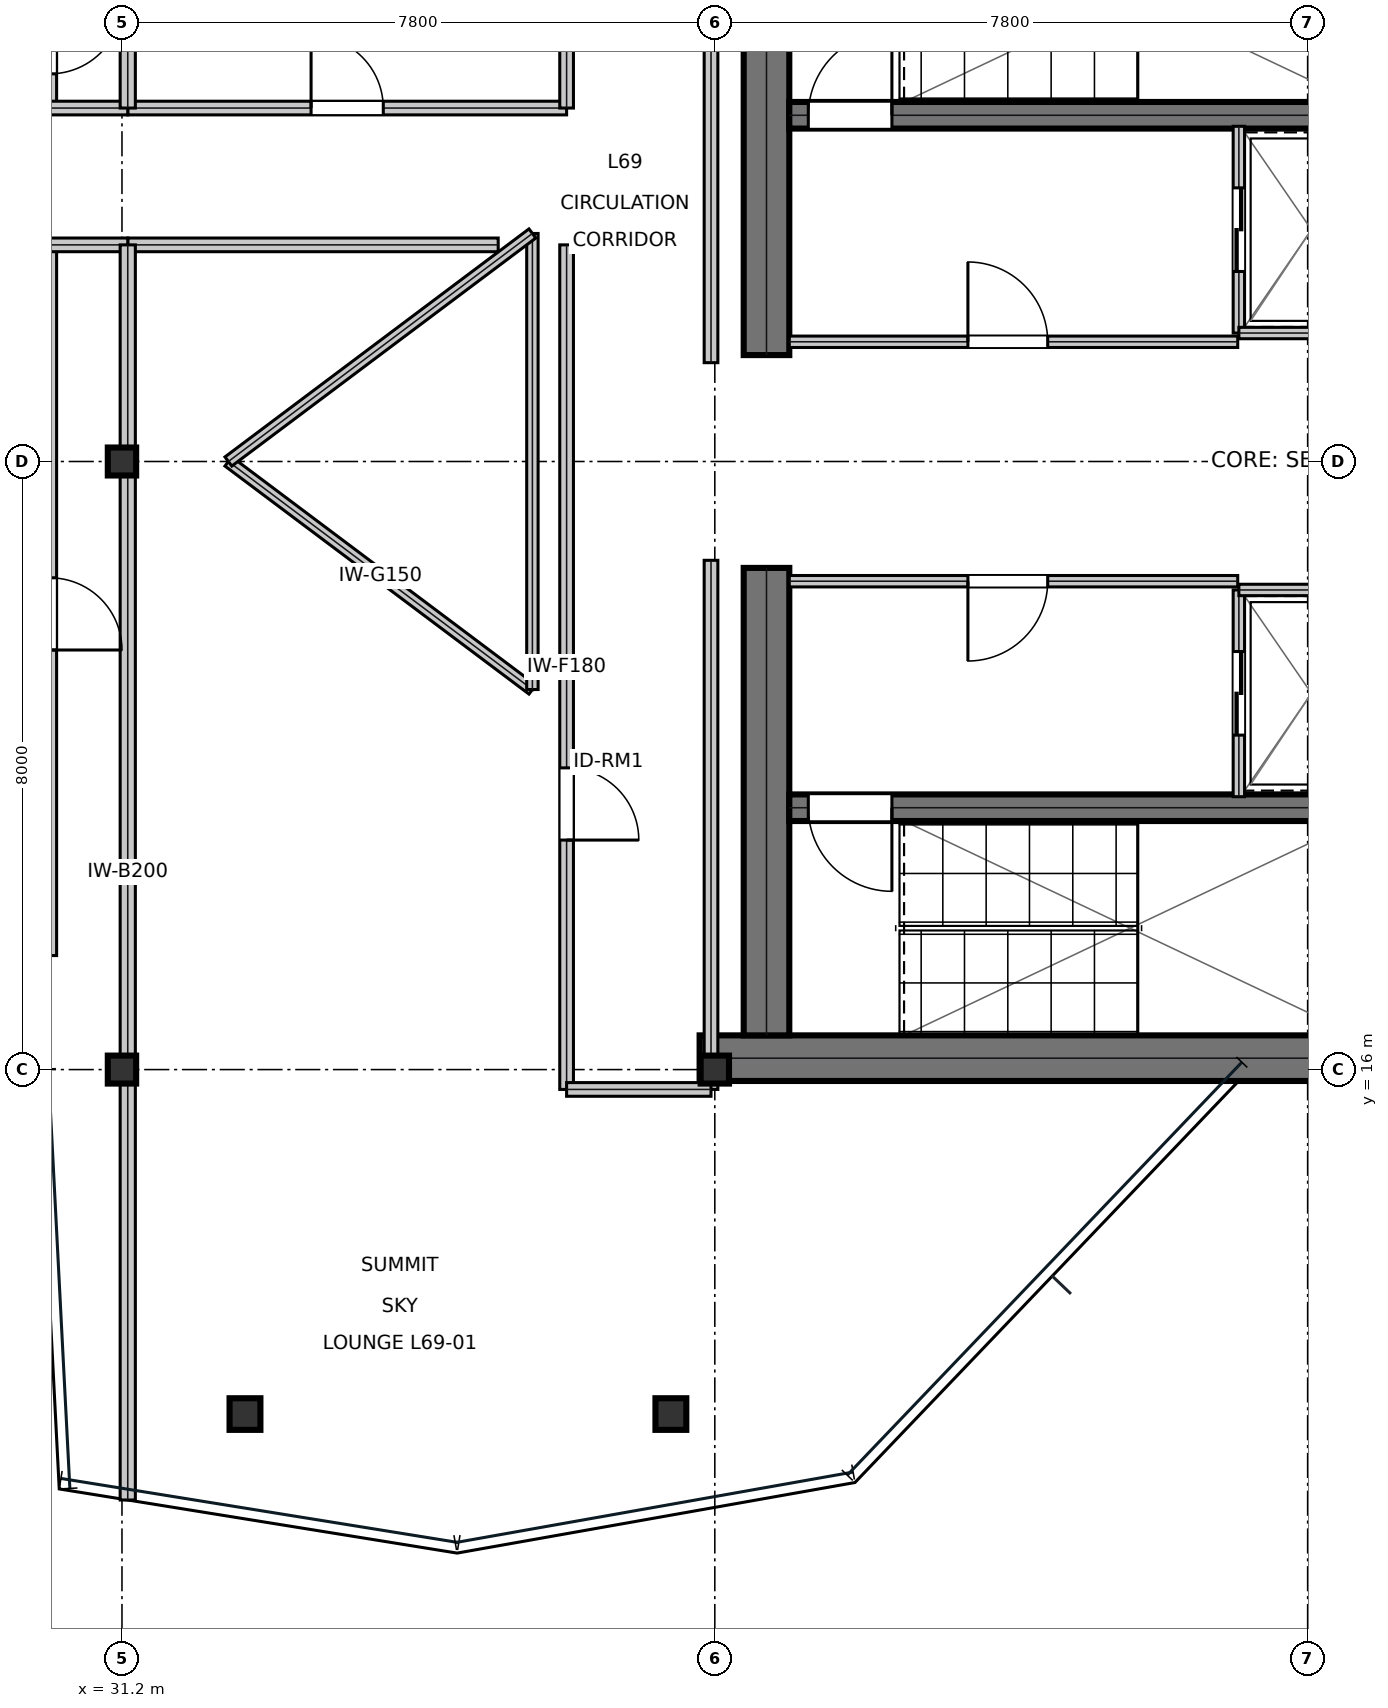
"""IFC4 building model, lengths in metres.
Left out: names, types, materials, properties, quantities, classifications, styles, units other than length and angle.
Written with IfcOpenShell. Run it as: python <this file> out.ifc"""

import sys

from ifc_helpers import new_model, si_unit, direction, frame, frame_2d, origin, origin_2d, place, context, subcontext, project, spatial, rectangle, i_section, extrude, element, fill, save


model = new_model("IFC4")
c1 = context("Model", 3, precision=1e-05, world=origin(), true_north=direction((0.0, 1.0)))
c2 = subcontext(c1, "Body", "Model", "MODEL_VIEW")
j1 = project(units=[si_unit("LENGTHUNIT", "METRE"), si_unit("PLANEANGLEUNIT", "RADIAN")], contexts=[c1])
p1 = place(None, origin())
s1 = spatial("IfcSite", under=j1, at=p1, CompositionType="ELEMENT")
p2 = place(p1, origin())
s2 = spatial("IfcBuilding", under=s1, at=p2, CompositionType="ELEMENT")
p3 = place(p2, frame((0.0, 0.0, 295.2)))
s3 = spatial("IfcBuildingStorey", under=s2, at=p3, CompositionType="ELEMENT", Elevation=295.2)
p4 = place(p3, frame((38.8, 16.15, 0.0), z_axis=(0.0, 0.0, 1.0), x_axis=(1.0, 0.0, 0.0)))
e1 = element("IfcWall", 1, at=p4, inside=s3, PredefinedType="SHEAR", context=c2, shape_type="SweptSolid", body=[
    extrude(rectangle(XDim=16.0, YDim=0.6, at=frame_2d((8.0, 0.0))), origin(), (0.0, 0.0, 1.0), 3.81),
])
for number, where, z_axis, x_axis in (
    (2, (39.68, 16.45, 0.0), (0.0, 0.0, 1.0), (0.0, 1.0, 0.0)),
    (3, (39.68, 25.4, 0.0), (0.0, 0.0, 1.0), (0.0, 1.0, 0.0)),
):
    element("IfcWall", number, at=place(p3, frame(where, z_axis=z_axis, x_axis=x_axis)), inside=s3, PredefinedType="SHEAR", context=c2, shape_type="SweptSolid", body=[
        extrude(rectangle(XDim=6.15, YDim=0.6, at=frame_2d((3.075, 0.0))), origin(), (0.0, 0.0, 1.0), 3.81),
    ])
p5 = place(p3, frame((39.98, 28.555, 0.0), z_axis=(0.0, 0.0, 1.0), x_axis=(1.0, 0.0, 0.0)))
e4 = element("IfcWall", 4, at=p5, inside=s3, PredefinedType="SHEAR", context=c2, shape_type="SweptSolid", body=[
    extrude(rectangle(XDim=7.71, YDim=0.35, at=frame_2d((3.855, 0.0))), origin(), (0.0, 0.0, 1.0), 3.81),
])
p6 = place(p5, frame((0.25, 0.0, 0.0)))
e5 = element("IfcOpeningElement", 5, at=p6, cuts=e4, PredefinedType="OPENING", context=c2, shape_type="SweptSolid", body=[
    extrude(rectangle(XDim=1.1, YDim=2.15, at=frame_2d((0.55, 1.075))), frame((0.0, 0.185, 0.0), z_axis=(0.0, -1.0, 0.0), x_axis=(1.0, 0.0, 0.0)), (0.0, 0.0, 1.0), 0.37),
])
p7 = place(p3, frame((39.98, 19.445, 0.0), z_axis=(0.0, 0.0, 1.0), x_axis=(1.0, 0.0, 0.0)))
e6 = element("IfcWall", 6, at=p7, inside=s3, PredefinedType="SHEAR", context=c2, shape_type="SweptSolid", body=[
    extrude(rectangle(XDim=7.71, YDim=0.35, at=frame_2d((3.855, 0.0))), origin(), (0.0, 0.0, 1.0), 3.81),
])
p8 = place(p7, frame((0.25, 0.0, 0.0)))
e7 = element("IfcOpeningElement", 7, at=p8, cuts=e6, PredefinedType="OPENING", context=c2, shape_type="SweptSolid", body=[
    extrude(rectangle(XDim=1.1, YDim=2.15, at=frame_2d((0.55, 1.075))), frame((0.0, 0.185, 0.0), z_axis=(0.0, -1.0, 0.0), x_axis=(1.0, 0.0, 0.0)), (0.0, 0.0, 1.0), 0.37),
])
for number, where, z_axis, x_axis in (
    (8, (31.2, 16.0, 0.0), (0.0, 0.0, 1.0), (1.0, 0.0, 0.0)),
    (9, (31.2, 24.0, 0.0), (0.0, 0.0, 1.0), (1.0, 0.0, 0.0)),
    (10, (39.0, 16.0, 0.0), (0.0, 0.0, 1.0), (1.0, 0.0, 0.0)),
):
    element("IfcColumn", number, at=place(p3, frame(where, z_axis=z_axis, x_axis=x_axis)), inside=s3, PredefinedType="COLUMN", context=c2, shape_type="SweptSolid", body=[
        extrude(i_section(OverallWidth=0.373, OverallDepth=0.368, WebThickness=0.015, FlangeThickness=0.024, at=origin_2d()), origin(), (0.0, 0.0, 1.0), 4.044),
    ])
for number, where, z_axis, x_axis in (
    (11, (32.818, 11.468, 0.016), (0.0, 0.0, 1.0), (1.0, 0.0, 0.0)),
    (12, (38.422, 11.468, 0.016), (0.0, 0.0, 1.0), (1.0, 0.0, 0.0)),
):
    element("IfcColumn", number, at=place(p3, frame(where, z_axis=z_axis, x_axis=x_axis)), inside=s3, PredefinedType="COLUMN", context=c2, shape_type="SweptSolid", body=[
        extrude(i_section(OverallWidth=0.406, OverallDepth=0.416, WebThickness=0.03, FlangeThickness=0.048, at=origin_2d()), origin(), (0.0, 0.0, 1.0), 4.018),
    ])
p9 = place(p3, frame((39.98, 25.575, 0.0), z_axis=(0.0, 0.0, 1.0), x_axis=(1.0, 0.0, 0.0)))
e13 = element("IfcWall", 13, at=p9, inside=s3, PredefinedType="PARTITIONING", context=c2, shape_type="SweptSolid", body=[
    extrude(rectangle(XDim=5.9, YDim=0.15, at=frame_2d((2.95, 0.0))), origin(), (0.0, 0.0, 1.0), 3.81),
])
p10 = place(p9, frame((2.35, 0.0, 0.0)))
e14 = element("IfcOpeningElement", 14, at=p10, cuts=e13, PredefinedType="OPENING", context=c2, shape_type="SweptSolid", body=[
    extrude(rectangle(XDim=1.05, YDim=2.15, at=frame_2d((0.525, 1.075))), frame((0.0, 0.085, 0.0), z_axis=(0.0, -1.0, 0.0), x_axis=(1.0, 0.0, 0.0)), (0.0, 0.0, 1.0), 0.17),
])
p11 = place(p3, frame((39.98, 22.425, 0.0), z_axis=(0.0, 0.0, 1.0), x_axis=(1.0, 0.0, 0.0)))
e15 = element("IfcWall", 15, at=p11, inside=s3, PredefinedType="PARTITIONING", context=c2, shape_type="SweptSolid", body=[
    extrude(rectangle(XDim=5.9, YDim=0.15, at=frame_2d((2.95, 0.0))), origin(), (0.0, 0.0, 1.0), 3.81),
])
p12 = place(p11, frame((2.35, 0.0, 0.0)))
e16 = element("IfcOpeningElement", 16, at=p12, cuts=e15, PredefinedType="OPENING", context=c2, shape_type="SweptSolid", body=[
    extrude(rectangle(XDim=1.05, YDim=2.15, at=frame_2d((0.525, 1.075))), frame((0.0, 0.085, 0.0), z_axis=(0.0, -1.0, 0.0), x_axis=(1.0, 0.0, 0.0)), (0.0, 0.0, 1.0), 0.17),
])
p13 = place(p3, frame((45.895, 25.69, 0.0), z_axis=(0.0, 0.0, 1.0), x_axis=(0.0, 1.0, 0.0)))
e17 = element("IfcWall", 17, at=p13, inside=s3, PredefinedType="PARTITIONING", context=c2, shape_type="SweptSolid", body=[
    extrude(rectangle(XDim=2.72, YDim=0.15, at=frame_2d((1.36, 0.0))), origin(), (0.0, 0.0, 1.0), 3.81),
])
p14 = place(p13, frame((0.81, 0.0, 0.0)))
e18 = element("IfcOpeningElement", 18, at=p14, cuts=e17, PredefinedType="OPENING", context=c2, shape_type="SweptSolid", body=[
    extrude(rectangle(XDim=1.1, YDim=2.15, at=frame_2d((0.55, 1.075))), frame((0.0, 0.085, 0.0), z_axis=(0.0, -1.0, 0.0), x_axis=(1.0, 0.0, 0.0)), (0.0, 0.0, 1.0), 0.17),
])
p15 = place(p3, frame((45.895, 25.69, 0.0), z_axis=(0.0, 0.0, 1.0), x_axis=(1.0, 0.0, 0.0)))
e19 = element("IfcWall", 19, at=p15, inside=s3, PredefinedType="PARTITIONING", context=c2, shape_type="SweptSolid", body=[
    extrude(rectangle(XDim=1.915, YDim=0.15, at=frame_2d((0.958, 0.0))), origin(), (0.0, 0.0, 1.0), 3.81),
])
p16 = place(p3, frame((45.895, 19.59, 0.0), z_axis=(0.0, 0.0, 1.0), x_axis=(0.0, 1.0, 0.0)))
e20 = element("IfcWall", 20, at=p16, inside=s3, PredefinedType="PARTITIONING", context=c2, shape_type="SweptSolid", body=[
    extrude(rectangle(XDim=2.72, YDim=0.15, at=frame_2d((1.36, 0.0))), origin(), (0.0, 0.0, 1.0), 3.81),
])
p17 = place(p16, frame((0.81, 0.0, 0.0)))
e21 = element("IfcOpeningElement", 21, at=p17, cuts=e20, PredefinedType="OPENING", context=c2, shape_type="SweptSolid", body=[
    extrude(rectangle(XDim=1.1, YDim=2.15, at=frame_2d((0.55, 1.075))), frame((0.0, 0.085, 0.0), z_axis=(0.0, -1.0, 0.0), x_axis=(1.0, 0.0, 0.0)), (0.0, 0.0, 1.0), 0.17),
])
p18 = place(p3, frame((45.895, 22.31, 0.0), z_axis=(0.0, 0.0, 1.0), x_axis=(1.0, 0.0, 0.0)))
e22 = element("IfcWall", 22, at=p18, inside=s3, PredefinedType="PARTITIONING", context=c2, shape_type="SweptSolid", body=[
    extrude(rectangle(XDim=1.915, YDim=0.15, at=frame_2d((0.958, 0.0))), origin(), (0.0, 0.0, 1.0), 3.81),
])
p19 = place(p3, frame((37.05, 15.739, 0.0), z_axis=(0.0, 0.0, 1.0), x_axis=(0.0, 1.0, 0.0)))
e23 = element("IfcWall", 23, at=p19, inside=s3, PredefinedType="SOLIDWALL", context=c2, shape_type="SweptSolid", body=[
    extrude(rectangle(XDim=11.111, YDim=0.18, at=frame_2d((5.556, 0.0))), origin(), (0.0, 0.0, 1.0), 3.27),
])
p20 = place(p19, frame((3.281, 0.0, 0.0)))
e24 = element("IfcOpeningElement", 24, at=p20, cuts=e23, PredefinedType="OPENING", context=c2, shape_type="SweptSolid", body=[
    extrude(rectangle(XDim=0.95, YDim=2.15, at=frame_2d((0.475, 1.075))), frame((0.0, 0.1, 0.0), z_axis=(0.0, -1.0, 0.0), x_axis=(1.0, 0.0, 0.0)), (0.0, 0.0, 1.0), 0.2),
])
p21 = place(p3, frame((30.25, 17.5, 0.0), z_axis=(0.0, 0.0, 1.0), x_axis=(0.0, 1.0, 0.0)))
e25 = element("IfcWall", 25, at=p21, inside=s3, PredefinedType="SOLIDWALL", context=c2, shape_type="SweptSolid", body=[
    extrude(rectangle(XDim=9.35, YDim=0.18, at=frame_2d((4.675, 0.0))), origin(), (0.0, 0.0, 1.0), 3.27),
])
p22 = place(p21, frame((4.02, 0.0, 0.0)))
e26 = element("IfcOpeningElement", 26, at=p22, cuts=e25, PredefinedType="OPENING", context=c2, shape_type="SweptSolid", body=[
    extrude(rectangle(XDim=0.95, YDim=2.15, at=frame_2d((0.475, 1.075))), frame((0.0, 0.1, 0.0), z_axis=(0.0, -1.0, 0.0), x_axis=(1.0, 0.0, 0.0)), (0.0, 0.0, 1.0), 0.2),
])
p23 = place(p3, frame((30.25, 28.65, 0.0), z_axis=(0.0, 0.0, 1.0), x_axis=(0.0, 1.0, 0.0)))
e27 = element("IfcWall", 27, at=p23, inside=s3, PredefinedType="SOLIDWALL", context=c2, shape_type="SweptSolid", body=[
    extrude(rectangle(XDim=1.85, YDim=0.18, at=frame_2d((0.925, 0.0))), origin(), (0.0, 0.0, 1.0), 3.81),
])
p24 = place(p23, frame((0.45, 0.0, 0.0)))
e28 = element("IfcOpeningElement", 28, at=p24, cuts=e27, PredefinedType="OPENING", context=c2, shape_type="SweptSolid", body=[
    extrude(rectangle(XDim=0.95, YDim=2.15, at=frame_2d((0.475, 1.075))), frame((0.0, 0.1, 0.0), z_axis=(0.0, -1.0, 0.0), x_axis=(1.0, 0.0, 0.0)), (0.0, 0.0, 1.0), 0.2),
])
p25 = place(p3, frame((31.276, 28.65, 0.0), z_axis=(0.0, 0.0, 1.0), x_axis=(1.0, 0.0, 0.0)))
e29 = element("IfcWall", 29, at=p25, inside=s3, PredefinedType="SOLIDWALL", context=c2, shape_type="SweptSolid", body=[
    extrude(rectangle(XDim=5.774, YDim=0.18, at=frame_2d((2.887, 0.0))), origin(), (0.0, 0.0, 1.0), 3.81),
])
p26 = place(p25, frame((2.412, 0.0, 0.0)))
e30 = element("IfcOpeningElement", 30, at=p26, cuts=e29, PredefinedType="OPENING", context=c2, shape_type="SweptSolid", body=[
    extrude(rectangle(XDim=0.95, YDim=2.15, at=frame_2d((0.475, 1.075))), frame((0.0, 0.1, 0.0), z_axis=(0.0, -1.0, 0.0), x_axis=(1.0, 0.0, 0.0)), (0.0, 0.0, 1.0), 0.2),
])
p27 = place(p3, frame((38.95, 15.739, 0.0), z_axis=(0.0, 0.0, 1.0), x_axis=(0.0, 1.0, 0.0)))
e31 = element("IfcWall", 31, at=p27, inside=s3, PredefinedType="SOLIDWALL", context=c2, shape_type="SweptSolid", body=[
    extrude(rectangle(XDim=6.961, YDim=0.18, at=frame_2d((3.48, 0.0))), origin(), (0.0, 0.0, 1.0), 3.27),
])
p28 = place(p3, frame((31.276, 26.85, 0.0), z_axis=(0.0, 0.0, 1.0), x_axis=(1.0, 0.0, 0.0)))
e32 = element("IfcWall", 32, at=p28, inside=s3, PredefinedType="SOLIDWALL", context=c2, shape_type="SweptSolid", body=[
    extrude(rectangle(XDim=4.874, YDim=0.18, at=frame_2d((2.437, 0.0))), origin(), (0.0, 0.0, 1.0), 3.81),
])
p29 = place(p3, frame((37.05, 15.739, 0.0), z_axis=(0.0, 0.0, 1.0), x_axis=(1.0, 0.0, 0.0)))
e33 = element("IfcWall", 33, at=p29, inside=s3, PredefinedType="SOLIDWALL", context=c2, shape_type="SweptSolid", body=[
    extrude(rectangle(XDim=1.9, YDim=0.18, at=frame_2d((0.95, 0.0))), origin(), (0.0, 0.0, 1.0), 3.27),
])
for number, where, z_axis, x_axis in (
    (34, (30.25, 26.85, 0.0), (0.0, 0.0, 1.0), (1.0, 0.0, 0.0)),
    (35, (30.25, 28.65, 0.0), (0.0, 0.0, 1.0), (1.0, 0.0, 0.0)),
):
    element("IfcWall", number, at=place(p3, frame(where, z_axis=z_axis, x_axis=x_axis)), inside=s3, PredefinedType="SOLIDWALL", context=c2, shape_type="SweptSolid", body=[
        extrude(rectangle(XDim=1.026, YDim=0.18, at=frame_2d((0.513, 0.0))), origin(), (0.0, 0.0, 1.0), 3.27),
    ])
p30 = place(p3, frame((38.95, 25.3, 0.0), z_axis=(0.0, 0.0, 1.0), x_axis=(0.0, 1.0, 0.0)))
e36 = element("IfcWall", 36, at=p30, inside=s3, PredefinedType="SOLIDWALL", context=c2, shape_type="SweptSolid", body=[
    extrude(rectangle(XDim=6.961, YDim=0.18, at=frame_2d((3.48, 0.0))), origin(), (0.0, 0.0, 1.0), 3.27),
])
p31 = place(p3, frame((37.05, 28.65, 0.0), z_axis=(0.0, 0.0, 1.0), x_axis=(0.0, 1.0, 0.0)))
e37 = element("IfcWall", 37, at=p31, inside=s3, PredefinedType="SOLIDWALL", context=c2, shape_type="SweptSolid", body=[
    extrude(rectangle(XDim=3.611, YDim=0.18, at=frame_2d((1.806, 0.0))), origin(), (0.0, 0.0, 1.0), 3.27),
])
p32 = place(p3, frame((31.276, 10.337, 0.0), z_axis=(0.0, 0.0, 1.0), x_axis=(0.0, 1.0, 0.0)))
e38 = element("IfcWall", 38, at=p32, inside=s3, PredefinedType="SOLIDWALL", context=c2, shape_type="SweptSolid", body=[
    extrude(rectangle(XDim=16.513, YDim=0.2, at=frame_2d((8.256, 0.0))), origin(), (0.0, 0.0, 1.0), 3.27),
])
p33 = place(p3, frame((31.276, 28.65, 0.0), z_axis=(0.0, 0.0, 1.0), x_axis=(0.0, 1.0, 0.0)))
e39 = element("IfcWall", 39, at=p33, inside=s3, PredefinedType="SOLIDWALL", context=c2, shape_type="SweptSolid", body=[
    extrude(rectangle(XDim=9.013, YDim=0.2, at=frame_2d((4.506, 0.0))), origin(), (0.0, 0.0, 1.0), 3.27),
])
p34 = place(p3, frame((32.6, 24.0, 0.0), z_axis=(0.0, 0.0, 1.0), x_axis=(0.8, -0.6, 0.0)))
e40 = element("IfcWall", 40, at=p34, inside=s3, PredefinedType="MOVABLE", context=c2, shape_type="SweptSolid", body=[
    extrude(rectangle(XDim=5.0, YDim=0.15, at=frame_2d((2.5, 0.0))), origin(), (0.0, 0.0, 1.0), 3.81),
])
p35 = place(p3, frame((36.6, 21.0, 0.0), z_axis=(0.0, 0.0, 1.0), x_axis=(0.0, 1.0, 0.0)))
e41 = element("IfcWall", 41, at=p35, inside=s3, PredefinedType="MOVABLE", context=c2, shape_type="SweptSolid", body=[
    extrude(rectangle(XDim=6.0, YDim=0.15, at=frame_2d((3.0, 0.0))), origin(), (0.0, 0.0, 1.0), 3.81),
])
p36 = place(p3, frame((36.6, 27.0, 0.0), z_axis=(0.0, 0.0, 1.0), x_axis=(-0.8, -0.6, 0.0)))
e42 = element("IfcWall", 42, at=p36, inside=s3, PredefinedType="MOVABLE", context=c2, shape_type="SweptSolid", body=[
    extrude(rectangle(XDim=5.0, YDim=0.15, at=frame_2d((2.5, 0.0))), origin(), (0.0, 0.0, 1.0), 3.81),
])
p37 = place(p10, origin())
e43 = element("IfcDoor", 43, at=p37, inside=s3, OperationType="SINGLE_SWING_LEFT", PredefinedType="DOOR", context=c2, shape_type="SweptSolid", body=[
    extrude(rectangle(XDim=1.05, YDim=2.15, at=frame_2d((0.525, 1.075))), frame((0.0, 0.025, 0.0), z_axis=(0.0, -1.0, 0.0), x_axis=(1.0, 0.0, 0.0)), (0.0, 0.0, 1.0), 0.05),
])
fill(e14, e43)
p38 = place(p12, frame((1.05, 0.0, 0.0), z_axis=(0.0, 0.0, 1.0), x_axis=(-1.0, 0.0, 0.0)))
e44 = element("IfcDoor", 44, at=p38, inside=s3, OperationType="SINGLE_SWING_RIGHT", PredefinedType="DOOR", context=c2, shape_type="SweptSolid", body=[
    extrude(rectangle(XDim=1.05, YDim=2.15, at=frame_2d((0.525, 1.075))), frame((0.0, 0.025, 0.0), z_axis=(0.0, -1.0, 0.0), x_axis=(1.0, 0.0, 0.0)), (0.0, 0.0, 1.0), 0.05),
])
fill(e16, e44)
p39 = place(p14, frame((1.1, 0.0, 0.0), z_axis=(0.0, 0.0, 1.0), x_axis=(-1.0, 0.0, 0.0)))
e45 = element("IfcDoor", 45, at=p39, inside=s3, OperationType="DOUBLE_DOOR_SLIDING", PredefinedType="DOOR", context=c2, shape_type="SweptSolid", body=[
    extrude(rectangle(XDim=1.1, YDim=2.15, at=frame_2d((0.55, 1.075))), frame((0.0, 0.025, 0.0), z_axis=(0.0, -1.0, 0.0), x_axis=(1.0, 0.0, 0.0)), (0.0, 0.0, 1.0), 0.05),
])
fill(e18, e45)
p40 = place(p17, frame((1.1, 0.0, 0.0), z_axis=(0.0, 0.0, 1.0), x_axis=(-1.0, 0.0, 0.0)))
e46 = element("IfcDoor", 46, at=p40, inside=s3, OperationType="DOUBLE_DOOR_SLIDING", PredefinedType="DOOR", context=c2, shape_type="SweptSolid", body=[
    extrude(rectangle(XDim=1.1, YDim=2.15, at=frame_2d((0.55, 1.075))), frame((0.0, 0.025, 0.0), z_axis=(0.0, -1.0, 0.0), x_axis=(1.0, 0.0, 0.0)), (0.0, 0.0, 1.0), 0.05),
])
fill(e21, e46)
p41 = place(p20, frame((0.95, 0.0, 0.0), z_axis=(0.0, 0.0, 1.0), x_axis=(-1.0, 0.0, 0.0)))
e47 = element("IfcDoor", 47, at=p41, inside=s3, OperationType="SINGLE_SWING_RIGHT", PredefinedType="DOOR", context=c2, shape_type="SweptSolid", body=[
    extrude(rectangle(XDim=0.95, YDim=2.15, at=frame_2d((0.475, 1.075))), frame((0.0, 0.025, 0.0), z_axis=(0.0, -1.0, 0.0), x_axis=(1.0, 0.0, 0.0)), (0.0, 0.0, 1.0), 0.05),
])
fill(e24, e47)
p42 = place(p26, origin())
e48 = element("IfcDoor", 48, at=p42, inside=s3, OperationType="SINGLE_SWING_LEFT", PredefinedType="DOOR", context=c2, shape_type="SweptSolid", body=[
    extrude(rectangle(XDim=0.95, YDim=2.15, at=frame_2d((0.475, 1.075))), frame((0.0, 0.025, 0.0), z_axis=(0.0, -1.0, 0.0), x_axis=(1.0, 0.0, 0.0)), (0.0, 0.0, 1.0), 0.05),
])
fill(e30, e48)
p43 = place(p6, origin())
e49 = element("IfcDoor", 49, at=p43, inside=s3, OperationType="SINGLE_SWING_RIGHT", PredefinedType="DOOR", context=c2, shape_type="SweptSolid", body=[
    extrude(rectangle(XDim=1.1, YDim=2.15, at=frame_2d((0.55, 1.075))), frame((0.0, 0.025, 0.0), z_axis=(0.0, -1.0, 0.0), x_axis=(1.0, 0.0, 0.0)), (0.0, 0.0, 1.0), 0.05),
])
fill(e5, e49)
p44 = place(p8, frame((1.1, 0.0, 0.0), z_axis=(0.0, 0.0, 1.0), x_axis=(-1.0, 0.0, 0.0)))
e50 = element("IfcDoor", 50, at=p44, inside=s3, OperationType="SINGLE_SWING_LEFT", PredefinedType="DOOR", context=c2, shape_type="SweptSolid", body=[
    extrude(rectangle(XDim=1.1, YDim=2.15, at=frame_2d((0.55, 1.075))), frame((0.0, 0.025, 0.0), z_axis=(0.0, -1.0, 0.0), x_axis=(1.0, 0.0, 0.0)), (0.0, 0.0, 1.0), 0.05),
])
fill(e7, e50)
save(model, sys.argv[1])
